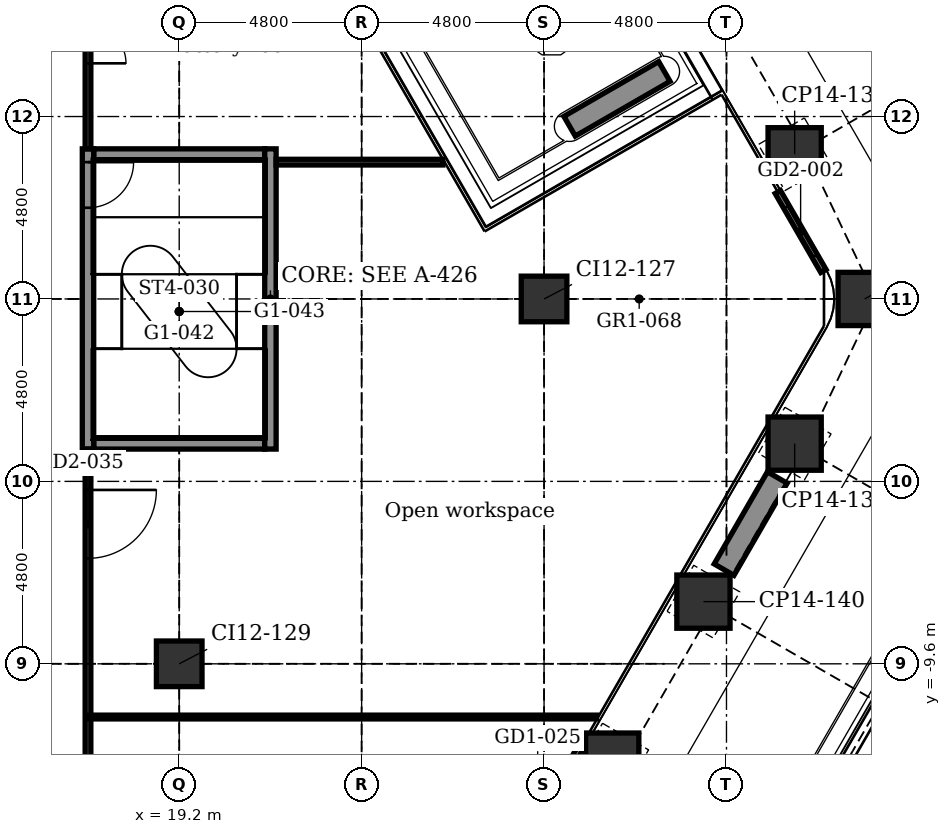
"""IFC4 building model, lengths in metres.
Left out: names, types, materials, properties, quantities, classifications, styles, units other than length and angle.
Written with IfcOpenShell. Run it as: python <this file> out.ifc"""

import sys

from ifc_helpers import new_model, si_unit, direction, frame, frame_2d, origin, origin_2d, place, context, subcontext, project, spatial, rectangle, extrude, element, fill, save


model = new_model("IFC4")
c1 = context("Model", 3, precision=1e-05, world=origin(), true_north=direction((0.0, 1.0)))
c2 = subcontext(c1, "Body", "Model", "MODEL_VIEW")
j1 = project(units=[si_unit("LENGTHUNIT", "METRE"), si_unit("PLANEANGLEUNIT", "RADIAN")], contexts=[c1])
p1 = place(None, origin())
s1 = spatial("IfcSite", under=j1, at=p1, CompositionType="ELEMENT")
p2 = place(p1, origin())
s2 = spatial("IfcBuilding", under=s1, at=p2, CompositionType="ELEMENT")
p3 = place(p2, frame((0.0, 0.0, 60.9)))
s3 = spatial("IfcBuildingStorey", under=s2, at=p3, CompositionType="ELEMENT", Elevation=60.9)
for number, where, z_axis, x_axis in (
    (1, (35.394, 3.807, -0.25), (0.0, 0.0, 1.0), (0.866, 0.5, 0.0)),
    (2, (37.236, 0.0, -0.25), (0.0, 0.0, 1.0), (1.0, 0.0, 0.0)),
    (3, (35.394, -3.807, -0.25), (0.0, 0.0, 1.0), (0.5, 0.866, 0.0)),
    (4, (32.994, -7.964, -0.25), (0.0, 0.0, 1.0), (0.5, 0.866, 0.0)),
    (5, (30.594, -12.121, -0.25), (0.0, 0.0, 1.0), (0.5, 0.866, 0.0)),
):
    element("IfcColumn", number, at=place(p3, frame(where, z_axis=z_axis, x_axis=x_axis)), inside=s3, PredefinedType="COLUMN", context=c2, shape_type="SweptSolid", body=[
        extrude(rectangle(XDim=1.4, YDim=1.4, at=origin_2d()), origin(), (0.0, 0.0, 1.0), 5.45),
    ])
for number, where, z_axis, x_axis in (
    (6, (19.2, -9.6, -0.25), (0.0, 0.0, 1.0), (1.0, 0.0, 0.0)),
    (7, (28.8, 0.0, -0.25), (0.0, 0.0, 1.0), (1.0, 0.0, 0.0)),
):
    element("IfcColumn", number, at=place(p3, frame(where, z_axis=z_axis, x_axis=x_axis)), inside=s3, PredefinedType="COLUMN", context=c2, shape_type="SweptSolid", body=[
        extrude(rectangle(XDim=1.2, YDim=1.2, at=origin_2d()), origin(), (0.0, 0.0, 1.0), 5.45),
    ])
for number, where, z_axis, x_axis in (
    (8, (16.95, -3.8, -0.25), (0.0, 0.0, 1.0), (1.0, 0.0, 0.0)),
    (9, (16.95, 3.8, -0.25), (0.0, 0.0, 1.0), (1.0, 0.0, 0.0)),
):
    element("IfcWall", number, at=place(p3, frame(where, z_axis=z_axis, x_axis=x_axis)), inside=s3, PredefinedType="STANDARD", context=c2, shape_type="SweptSolid", body=[
        extrude(rectangle(XDim=4.5, YDim=0.3, at=frame_2d((2.25, 0.0))), origin(), (0.0, 0.0, 1.0), 5.45),
    ])
p4 = place(p3, frame((16.8, -3.95, -0.25), z_axis=(0.0, 0.0, 1.0), x_axis=(0.0, 1.0, 0.0)))
e10 = element("IfcWall", 10, at=p4, inside=s3, PredefinedType="STANDARD", context=c2, shape_type="SweptSolid", body=[
    extrude(rectangle(XDim=7.9, YDim=0.3, at=frame_2d((3.95, 0.0))), origin(), (0.0, 0.0, 1.0), 5.45),
])
p5 = place(p4, frame((6.35, 0.0, 0.25)))
e11 = element("IfcOpeningElement", 11, at=p5, cuts=e10, PredefinedType="OPENING", context=c2, shape_type="SweptSolid", body=[
    extrude(rectangle(XDim=1.2, YDim=2.1, at=frame_2d((0.6, 1.05))), frame((0.0, 0.16, 0.0), z_axis=(0.0, -1.0, 0.0), x_axis=(1.0, 0.0, 0.0)), (0.0, 0.0, 1.0), 0.32),
])
p6 = place(p3, frame((21.6, -3.95, -0.25), z_axis=(0.0, 0.0, 1.0), x_axis=(0.0, 1.0, 0.0)))
e12 = element("IfcWall", 12, at=p6, inside=s3, PredefinedType="STANDARD", context=c2, shape_type="SweptSolid", body=[
    extrude(rectangle(XDim=7.9, YDim=0.3, at=frame_2d((3.95, 0.0))), origin(), (0.0, 0.0, 1.0), 5.45),
])
p7 = place(p3, frame((34.951, 2.814, 0.0), z_axis=(0.0, 0.0, 1.0), x_axis=(0.500001309137, -0.866024647952, 0.0)))
e13 = element("IfcWall", 13, at=p7, inside=s3, PredefinedType="PARTITIONING", context=c2, shape_type="SweptSolid", body=[
    extrude(rectangle(XDim=2.4, YDim=0.16, at=frame_2d((1.2, 0.0))), origin(), (0.0, 0.0, 1.0), 5.2),
])
p8 = place(p7, frame((0.45, 0.0, 0.0)))
e14 = element("IfcOpeningElement", 14, at=p8, cuts=e13, PredefinedType="OPENING", context=c2, shape_type="SweptSolid", body=[
    extrude(rectangle(XDim=1.5, YDim=2.4, at=frame_2d((0.75, 1.2))), frame((0.0, 0.09, 0.0), z_axis=(0.0, -1.0, 0.0), x_axis=(1.0, 0.0, 0.0)), (0.0, 0.0, 1.0), 0.18),
])
p9 = place(p3, frame((29.817, -11.707, 0.0), z_axis=(0.0, 0.0, 1.0), x_axis=(-0.499978080042, -0.866038058908, 0.0)))
e15 = element("IfcWall", 15, at=p9, inside=s3, PredefinedType="PARTITIONING", context=c2, shape_type="SweptSolid", body=[
    extrude(rectangle(XDim=4.74, YDim=0.16, at=frame_2d((2.37, 0.0))), origin(), (0.0, 0.0, 1.0), 5.2),
])
p10 = place(p9, frame((1.17, 0.0, 0.0)))
e16 = element("IfcOpeningElement", 16, at=p10, cuts=e15, PredefinedType="OPENING", context=c2, shape_type="SweptSolid", body=[
    extrude(rectangle(XDim=2.4, YDim=2.4, at=frame_2d((1.2, 1.2))), frame((0.0, 0.09, 0.0), z_axis=(0.0, -1.0, 0.0), x_axis=(1.0, 0.0, 0.0)), (0.0, 0.0, 1.0), 0.18),
])
p11 = place(p3, frame((34.937, -4.698, 0.0), z_axis=(0.0, 0.0, 1.0), x_axis=(-0.49998411664, -0.866034573852, 0.0)))
e17 = element("IfcWall", 17, at=p11, inside=s3, PredefinedType="USERDEFINED", context=c2, shape_type="SweptSolid", body=[
    extrude(rectangle(XDim=2.8, YDim=0.6, at=frame_2d((1.4, 0.0))), origin(), (0.0, 0.0, 1.0), 0.7),
])
p12 = place(p3, frame((29.471, 4.545, 0.0), z_axis=(0.0, 0.0, 1.0), x_axis=(0.866033125095, 0.499986626058, 0.0)))
e18 = element("IfcWall", 18, at=p12, inside=s3, PredefinedType="USERDEFINED", context=c2, shape_type="SweptSolid", body=[
    extrude(rectangle(XDim=2.88, YDim=0.6, at=frame_2d((1.44, 0.0))), origin(), (0.0, 0.0, 1.0), 0.7),
])
p13 = place(p3, frame((16.8, -12.4, 0.0), z_axis=(0.0, 0.0, 1.0), x_axis=(0.0, 1.0, 0.0)))
e19 = element("IfcWall", 19, at=p13, inside=s3, PredefinedType="PARTITIONING", context=c2, shape_type="SweptSolid", body=[
    extrude(rectangle(XDim=8.45, YDim=0.15, at=frame_2d((4.225, 0.0))), origin(), (0.0, 0.0, 1.0), 5.2),
])
p14 = place(p13, frame((5.575, 0.0, 0.0)))
e20 = element("IfcOpeningElement", 20, at=p14, cuts=e19, PredefinedType="OPENING", context=c2, shape_type="SweptSolid", body=[
    extrude(rectangle(XDim=1.8, YDim=2.1, at=frame_2d((0.9, 1.05))), frame((0.0, 0.085, 0.0), z_axis=(0.0, -1.0, 0.0), x_axis=(1.0, 0.0, 0.0)), (0.0, 0.0, 1.0), 0.17),
])
p15 = place(p3, frame((16.8, 3.95, 0.0), z_axis=(0.0, 0.0, 1.0), x_axis=(0.0, 1.0, 0.0)))
e21 = element("IfcWall", 21, at=p15, inside=s3, PredefinedType="PARTITIONING", context=c2, shape_type="SweptSolid", body=[
    extrude(rectangle(XDim=8.75, YDim=0.15, at=frame_2d((4.375, 0.0))), origin(), (0.0, 0.0, 1.0), 5.2),
])
p16 = place(p15, frame((2.25, 0.0, 0.0)))
e22 = element("IfcOpeningElement", 22, at=p16, cuts=e21, PredefinedType="OPENING", context=c2, shape_type="SweptSolid", body=[
    extrude(rectangle(XDim=1.0, YDim=2.1, at=frame_2d((0.5, 1.05))), frame((0.0, 0.085, 0.0), z_axis=(0.0, -1.0, 0.0), x_axis=(1.0, 0.0, 0.0)), (0.0, 0.0, 1.0), 0.17),
])
p17 = place(p15, frame((6.7, 0.0, 0.0)))
e23 = element("IfcOpeningElement", 23, at=p17, cuts=e21, PredefinedType="OPENING", context=c2, shape_type="SweptSolid", body=[
    extrude(rectangle(XDim=1.0, YDim=2.1, at=frame_2d((0.5, 1.05))), frame((0.0, 0.085, 0.0), z_axis=(0.0, -1.0, 0.0), x_axis=(1.0, 0.0, 0.0)), (0.0, 0.0, 1.0), 0.17),
])
p18 = place(p3, frame((16.8, -11.0, 0.0), z_axis=(0.0, 0.0, 1.0), x_axis=(1.0, 0.0, 0.0)))
e24 = element("IfcWall", 24, at=p18, inside=s3, PredefinedType="PARTITIONING", context=c2, shape_type="SweptSolid", body=[
    extrude(rectangle(XDim=13.378, YDim=0.1, at=frame_2d((6.689, 0.0))), origin(), (0.0, 0.0, 1.0), 5.2),
])
p19 = place(p3, frame((21.75, 3.6, 0.0), z_axis=(0.0, 0.0, 1.0), x_axis=(1.0, 0.0, 0.0)))
e25 = element("IfcWall", 25, at=p19, inside=s3, PredefinedType="PARTITIONING", context=c2, shape_type="SweptSolid", body=[
    extrude(rectangle(XDim=4.387, YDim=0.15, at=frame_2d((2.194, 0.0))), origin(), (0.0, 0.0, 1.0), 5.2),
])
p20 = place(p8, origin())
e26 = element("IfcDoor", 26, at=p20, inside=s3, OperationType="DOUBLE_DOOR_SLIDING", PredefinedType="DOOR", context=c2, shape_type="SweptSolid", body=[
    extrude(rectangle(XDim=1.5, YDim=2.4, at=frame_2d((0.75, 1.2))), frame((0.0, 0.025, 0.0), z_axis=(0.0, -1.0, 0.0), x_axis=(1.0, 0.0, 0.0)), (0.0, 0.0, 1.0), 0.05),
])
fill(e14, e26)
p21 = place(p14, frame((1.8, 0.0, 0.0), z_axis=(0.0, 0.0, 1.0), x_axis=(-1.0, 0.0, 0.0)))
e27 = element("IfcDoor", 27, at=p21, inside=s3, OperationType="SINGLE_SWING_RIGHT", PredefinedType="DOOR", context=c2, shape_type="SweptSolid", body=[
    extrude(rectangle(XDim=1.8, YDim=2.1, at=frame_2d((0.9, 1.05))), frame((0.0, 0.025, 0.0), z_axis=(0.0, -1.0, 0.0), x_axis=(1.0, 0.0, 0.0)), (0.0, 0.0, 1.0), 0.05),
])
fill(e20, e27)
p22 = place(p16, frame((1.0, 0.0, 0.0), z_axis=(0.0, 0.0, 1.0), x_axis=(-1.0, 0.0, 0.0)))
e28 = element("IfcDoor", 28, at=p22, inside=s3, OperationType="SINGLE_SWING_LEFT", PredefinedType="DOOR", context=c2, shape_type="SweptSolid", body=[
    extrude(rectangle(XDim=1.0, YDim=2.1, at=frame_2d((0.5, 1.05))), frame((0.0, 0.025, 0.0), z_axis=(0.0, -1.0, 0.0), x_axis=(1.0, 0.0, 0.0)), (0.0, 0.0, 1.0), 0.05),
])
fill(e22, e28)
p23 = place(p5, frame((1.2, 0.0, 0.0), z_axis=(0.0, 0.0, 1.0), x_axis=(-1.0, 0.0, 0.0)))
e29 = element("IfcDoor", 29, at=p23, inside=s3, OperationType="SINGLE_SWING_RIGHT", PredefinedType="DOOR", context=c2, shape_type="SweptSolid", body=[
    extrude(rectangle(XDim=1.2, YDim=2.1, at=frame_2d((0.6, 1.05))), frame((0.0, 0.025, 0.0), z_axis=(0.0, -1.0, 0.0), x_axis=(1.0, 0.0, 0.0)), (0.0, 0.0, 1.0), 0.05),
])
fill(e11, e29)
save(model, sys.argv[1])
